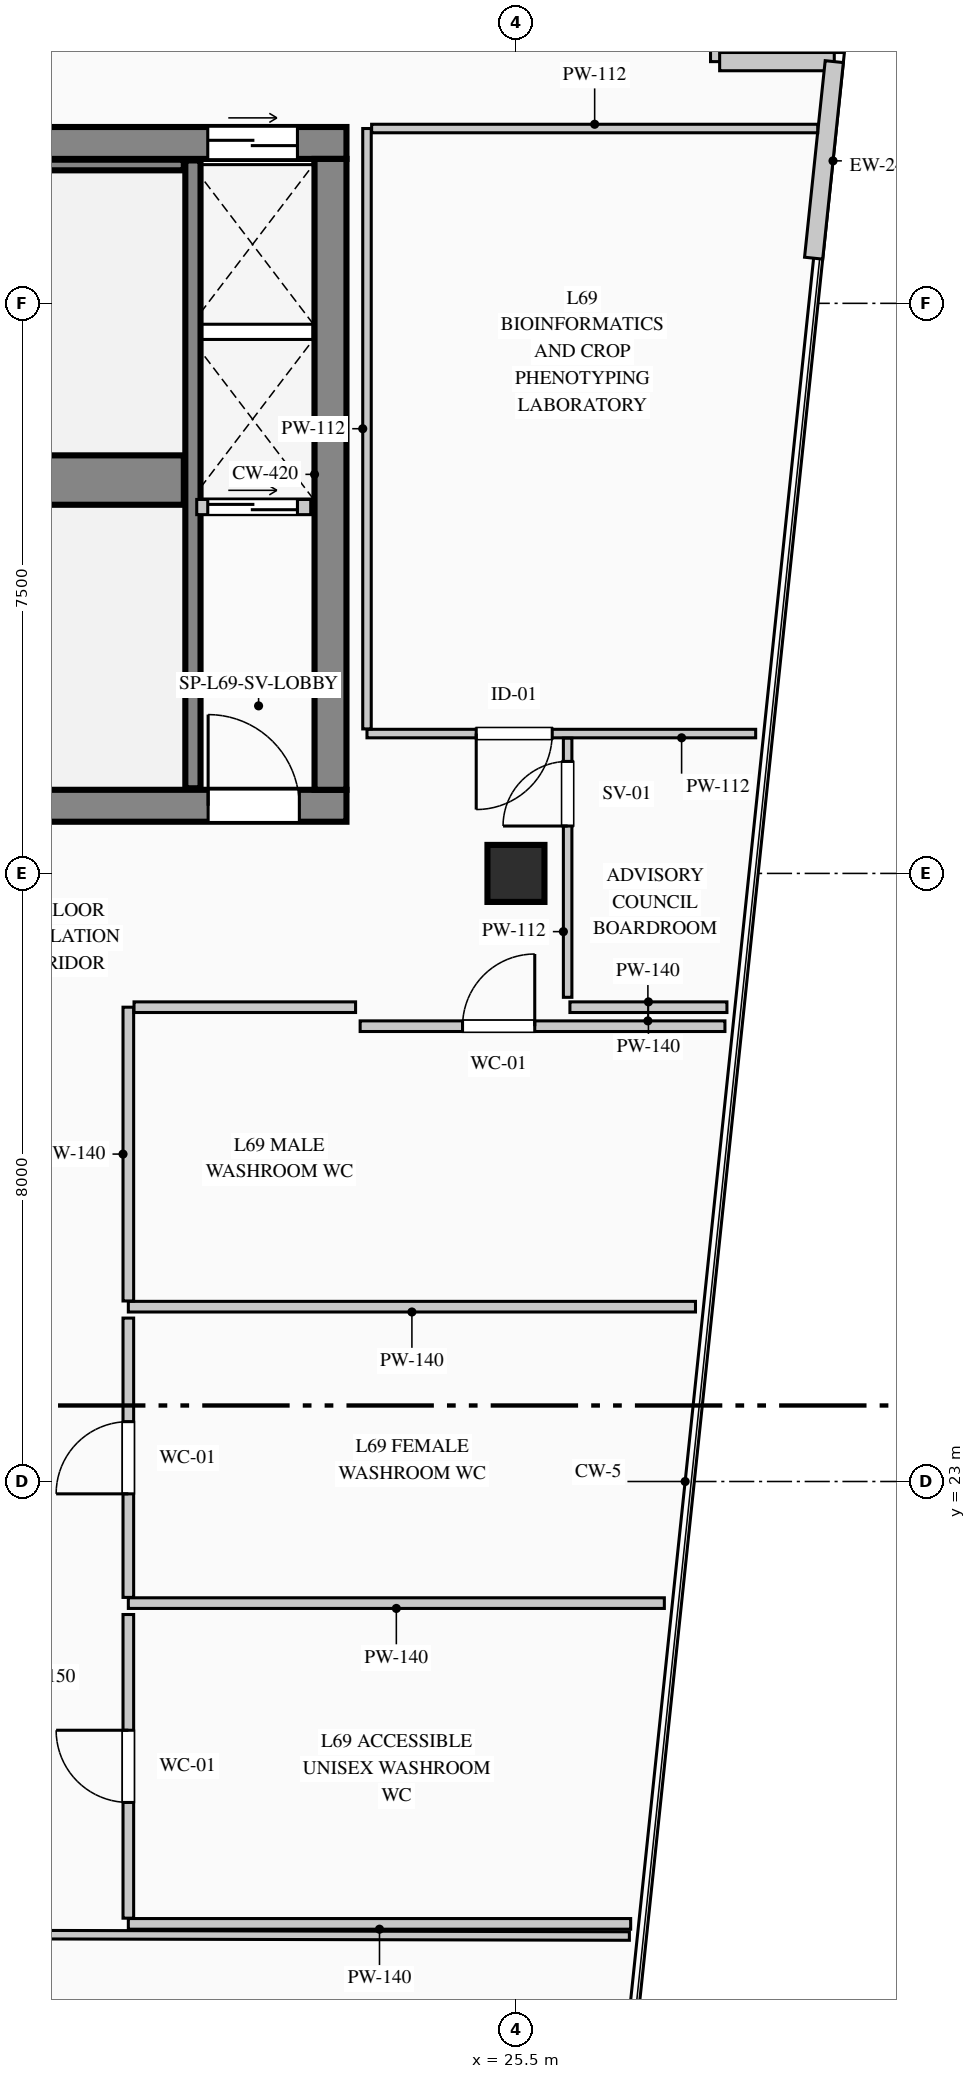
"""IFC4 building model, lengths in metres.
Left out: names, types, materials, properties, quantities, classifications, styles, units other than length and angle.
Written with IfcOpenShell. Run it as: python <this file> out.ifc"""

import sys

from ifc_helpers import new_model, si_unit, direction, frame, frame_2d, origin, origin_2d, place, context, subcontext, project, spatial, rectangle, extrude, element, fill, save


model = new_model("IFC4")
c1 = context("Model", 3, precision=1e-05, world=origin(), true_north=direction((0.0, 1.0)))
c2 = subcontext(c1, "Body", "Model", "MODEL_VIEW")
j1 = project(units=[si_unit("LENGTHUNIT", "METRE"), si_unit("PLANEANGLEUNIT", "RADIAN")], contexts=[c1])
p1 = place(None, origin())
s1 = spatial("IfcSite", under=j1, at=p1, CompositionType="ELEMENT")
p2 = place(p1, origin())
s2 = spatial("IfcBuilding", under=s1, at=p2, CompositionType="ELEMENT")
p3 = place(p2, frame((0.0, 0.0, 288.3)))
s3 = spatial("IfcBuildingStorey", under=s2, at=p3, CompositionType="ELEMENT", Elevation=288.3)
p4 = place(p3, frame((5.58, 40.61, 0.0), z_axis=(0.0, 0.0, 1.0), x_axis=(1.0, 0.0, 0.0)))
e1 = element("IfcWall", 1, at=p4, inside=s3, PredefinedType="SHEAR", context=c2, shape_type="SweptSolid", body=[
    extrude(rectangle(XDim=17.69, YDim=0.42, at=frame_2d((8.845, 0.0))), origin(), (0.0, 0.0, 1.0), 3.95),
])
p5 = place(p4, frame((15.865, 0.0, 0.0)))
e2 = element("IfcOpeningElement", 2, at=p5, cuts=e1, PredefinedType="OPENING", context=c2, shape_type="SweptSolid", body=[
    extrude(rectangle(XDim=1.18, YDim=2.25, at=frame_2d((0.59, 1.125))), frame((0.0, 0.22, 0.0), z_axis=(0.0, -1.0, 0.0), x_axis=(1.0, 0.0, 0.0)), (0.0, 0.0, 1.0), 0.44),
])
p6 = place(p3, frame((5.58, 31.89, 0.0), z_axis=(0.0, 0.0, 1.0), x_axis=(1.0, 0.0, 0.0)))
e3 = element("IfcWall", 3, at=p6, inside=s3, PredefinedType="SHEAR", context=c2, shape_type="SweptSolid", body=[
    extrude(rectangle(XDim=17.69, YDim=0.42, at=frame_2d((8.845, 0.0))), origin(), (0.0, 0.0, 1.0), 3.95),
])
p7 = place(p6, frame((3.07, 0.0, 0.0)))
e4 = element("IfcOpeningElement", 4, at=p7, cuts=e3, PredefinedType="OPENING", context=c2, shape_type="SweptSolid", body=[
    extrude(rectangle(XDim=1.2, YDim=2.2, at=frame_2d((0.6, 1.1))), frame((0.0, 0.22, 0.0), z_axis=(0.0, -1.0, 0.0), x_axis=(1.0, 0.0, 0.0)), (0.0, 0.0, 1.0), 0.44),
])
p8 = place(p6, frame((6.92, 0.0, 0.0)))
e5 = element("IfcOpeningElement", 5, at=p8, cuts=e3, PredefinedType="OPENING", context=c2, shape_type="SweptSolid", body=[
    extrude(rectangle(XDim=1.2, YDim=2.2, at=frame_2d((0.6, 1.1))), frame((0.0, 0.22, 0.0), z_axis=(0.0, -1.0, 0.0), x_axis=(1.0, 0.0, 0.0)), (0.0, 0.0, 1.0), 0.44),
])
p9 = place(p6, frame((8.77, 0.0, 0.0)))
e6 = element("IfcOpeningElement", 6, at=p9, cuts=e3, PredefinedType="OPENING", context=c2, shape_type="SweptSolid", body=[
    extrude(rectangle(XDim=1.15, YDim=2.2, at=frame_2d((0.575, 1.1))), frame((0.0, 0.22, 0.0), z_axis=(0.0, -1.0, 0.0), x_axis=(1.0, 0.0, 0.0)), (0.0, 0.0, 1.0), 0.44),
])
p10 = place(p6, frame((15.87, 0.0, 0.0)))
e7 = element("IfcOpeningElement", 7, at=p10, cuts=e3, PredefinedType="OPENING", context=c2, shape_type="SweptSolid", body=[
    extrude(rectangle(XDim=1.2, YDim=2.2, at=frame_2d((0.6, 1.1))), frame((0.0, 0.22, 0.0), z_axis=(0.0, -1.0, 0.0), x_axis=(1.0, 0.0, 0.0)), (0.0, 0.0, 1.0), 0.44),
])
p11 = place(p3, frame((23.06, 32.1, 0.0), z_axis=(0.0, 0.0, 1.0), x_axis=(0.0, 1.0, 0.0)))
e8 = element("IfcWall", 8, at=p11, inside=s3, PredefinedType="SHEAR", context=c2, shape_type="SweptSolid", body=[
    extrude(rectangle(XDim=8.3, YDim=0.42, at=frame_2d((4.15, 0.0))), origin(), (0.0, 0.0, 1.0), 3.95),
])
p12 = place(p3, frame((14.12, 36.175, 0.0), z_axis=(0.0, 0.0, 1.0), x_axis=(1.0, 0.0, 0.0)))
e9 = element("IfcWall", 9, at=p12, inside=s3, PredefinedType="SHEAR", context=c2, shape_type="SweptSolid", body=[
    extrude(rectangle(XDim=7.01, YDim=0.65, at=frame_2d((3.505, 0.0))), origin(), (0.0, 0.0, 1.0), 3.95),
])
p13 = place(p3, frame((21.25, 32.12, 0.0), z_axis=(0.0, 0.0, 1.0), x_axis=(0.0, 1.0, 0.0)))
e10 = element("IfcWall", 10, at=p13, inside=s3, PredefinedType="SHEAR", context=c2, shape_type="SweptSolid", body=[
    extrude(rectangle(XDim=8.26, YDim=0.2, at=frame_2d((4.13, 0.0))), origin(), (0.0, 0.0, 1.0), 3.95),
])
p14 = place(p3, frame((14.12, 40.32, 0.0), z_axis=(0.0, 0.0, 1.0), x_axis=(1.0, 0.0, 0.0)))
e11 = element("IfcWall", 11, at=p14, inside=s3, PredefinedType="SHEAR", context=c2, shape_type="SweptSolid", body=[
    extrude(rectangle(XDim=7.01, YDim=0.14, at=frame_2d((3.505, 0.0))), origin(), (0.0, 0.0, 1.0), 3.95),
])
p15 = place(p3, frame((25.5, 31.0, 0.0), z_axis=(0.0, 0.0, 1.0), x_axis=(1.0, 0.0, 0.0)))
e12 = element("IfcColumn", 12, at=p15, inside=s3, PredefinedType="COLUMN", context=c2, shape_type="SweptSolid", body=[
    extrude(rectangle(XDim=0.75, YDim=0.75, at=origin_2d()), origin(), (0.0, 0.0, 1.0), 3.95),
])
p16 = place(p3, frame((28.18, 43.38, 0.0), z_axis=(0.0, 0.0, 1.0), x_axis=(0.0, -1.0, 0.0)))
e13 = element("IfcWall", 13, at=p16, inside=s3, PredefinedType="STANDARD", context=c2, shape_type="SweptSolid", body=[
    extrude(rectangle(XDim=1.7, YDim=0.24, at=frame_2d((0.85, 0.0))), origin(), (0.0, 0.0, 1.0), 3.7),
])
p17 = place(p3, frame((28.18, 41.68, 0.0), z_axis=(0.0, 0.0, 1.0), x_axis=(1.0, 0.0, 0.0)))
e14 = element("IfcWall", 14, at=p17, inside=s3, PredefinedType="STANDARD", context=c2, shape_type="SweptSolid", body=[
    extrude(rectangle(XDim=1.508, YDim=0.24, at=frame_2d((0.754, 0.0))), origin(), (0.0, 0.0, 1.0), 3.7),
])
p18 = place(p3, frame((29.688, 41.68, 0.0), z_axis=(0.0, 0.0, 1.0), x_axis=(-0.104420821624, -0.994533203071, 0.0)))
e15 = element("IfcWall", 15, at=p18, inside=s3, PredefinedType="STANDARD", context=c2, shape_type="SweptSolid", body=[
    extrude(rectangle(XDim=2.6, YDim=0.24, at=frame_2d((1.3, 0.0))), origin(), (0.0, 0.0, 1.0), 3.7),
])
p19 = place(p3, frame((21.3, 35.82, 0.0), z_axis=(0.0, 0.0, 1.0), x_axis=(1.0, 0.0, 0.0)))
e16 = element("IfcWall", 16, at=p19, inside=s3, PredefinedType="PARTITIONING", context=c2, shape_type="SweptSolid", body=[
    extrude(rectangle(XDim=1.5, YDim=0.2, at=frame_2d((0.75, 0.0))), origin(), (0.0, 0.0, 1.0), 3.7),
])
p20 = place(p19, frame((0.145, 0.0, 0.0)))
e17 = element("IfcOpeningElement", 17, at=p20, cuts=e16, PredefinedType="OPENING", context=c2, shape_type="SweptSolid", body=[
    extrude(rectangle(XDim=1.18, YDim=2.25, at=frame_2d((0.59, 1.125))), frame((0.0, 0.11, 0.0), z_axis=(0.0, -1.0, 0.0), x_axis=(1.0, 0.0, 0.0)), (0.0, 0.0, 1.0), 0.22),
])
p21 = place(p3, frame((28.654, 32.84, 0.0), z_axis=(0.0, 0.0, 1.0), x_axis=(-1.0, 0.0, 0.0)))
e18 = element("IfcWall", 18, at=p21, inside=s3, PredefinedType="PARTITIONING", context=c2, shape_type="SweptSolid", body=[
    extrude(rectangle(XDim=5.114, YDim=0.112, at=frame_2d((2.557, 0.0))), origin(), (0.0, 0.0, 1.0), 3.7),
])
p22 = place(p21, frame((2.677, 0.0, 0.0)))
e19 = element("IfcOpeningElement", 19, at=p22, cuts=e18, PredefinedType="OPENING", context=c2, shape_type="SweptSolid", body=[
    extrude(rectangle(XDim=1.0, YDim=2.15, at=frame_2d((0.5, 1.075))), frame((0.0, 0.066, 0.0), z_axis=(0.0, -1.0, 0.0), x_axis=(1.0, 0.0, 0.0)), (0.0, 0.0, 1.0), 0.132),
])
p23 = place(p3, frame((23.54, 32.901, 0.0), z_axis=(0.0, 0.0, 1.0), x_axis=(0.0, 1.0, 0.0)))
e20 = element("IfcWall", 20, at=p23, inside=s3, PredefinedType="PARTITIONING", context=c2, shape_type="SweptSolid", body=[
    extrude(rectangle(XDim=7.899, YDim=0.112, at=frame_2d((3.95, 0.0))), origin(), (0.0, 0.0, 1.0), 3.7),
])
p24 = place(p3, frame((23.601, 40.8, 0.0), z_axis=(0.0, 0.0, 1.0), x_axis=(1.0, 0.0, 0.0)))
e21 = element("IfcWall", 21, at=p24, inside=s3, PredefinedType="PARTITIONING", context=c2, shape_type="SweptSolid", body=[
    extrude(rectangle(XDim=5.869, YDim=0.112, at=frame_2d((2.935, 0.0))), origin(), (0.0, 0.0, 1.0), 3.7),
])
p25 = place(p3, frame((23.45, 28.99, 0.0), z_axis=(0.0, 0.0, 1.0), x_axis=(1.0, 0.0, 0.0)))
e22 = element("IfcWall", 22, at=p25, inside=s3, PredefinedType="PARTITIONING", context=c2, shape_type="SweptSolid", body=[
    extrude(rectangle(XDim=4.8, YDim=0.14, at=frame_2d((2.4, 0.0))), origin(), (0.0, 0.0, 1.0), 3.7),
])
p26 = place(p25, frame((1.347, 0.0, 0.0)))
e23 = element("IfcOpeningElement", 23, at=p26, cuts=e22, PredefinedType="OPENING", context=c2, shape_type="SweptSolid", body=[
    extrude(rectangle(XDim=0.95, YDim=2.15, at=frame_2d((0.475, 1.075))), frame((0.0, 0.08, 0.0), z_axis=(0.0, -1.0, 0.0), x_axis=(1.0, 0.0, 0.0)), (0.0, 0.0, 1.0), 0.16),
])
p27 = place(p3, frame((26.21, 29.24, 0.0), z_axis=(0.0, 0.0, 1.0), x_axis=(1.0, 0.0, 0.0)))
e24 = element("IfcWall", 24, at=p27, inside=s3, PredefinedType="PARTITIONING", context=c2, shape_type="SweptSolid", body=[
    extrude(rectangle(XDim=2.066, YDim=0.14, at=frame_2d((1.033, 0.0))), origin(), (0.0, 0.0, 1.0), 3.7),
])
p28 = place(p3, frame((27.862, 25.3, 0.0), z_axis=(0.0, 0.0, 1.0), x_axis=(-1.0, 0.0, 0.0)))
e25 = element("IfcWall", 25, at=p28, inside=s3, PredefinedType="PARTITIONING", context=c2, shape_type="SweptSolid", body=[
    extrude(rectangle(XDim=7.462, YDim=0.14, at=frame_2d((3.731, 0.0))), origin(), (0.0, 0.0, 1.0), 3.7),
])
p29 = place(p3, frame((20.4, 25.375, 0.0), z_axis=(0.0, 0.0, 1.0), x_axis=(0.0, 1.0, 0.0)))
e26 = element("IfcWall", 26, at=p29, inside=s3, PredefinedType="PARTITIONING", context=c2, shape_type="SweptSolid", body=[
    extrude(rectangle(XDim=3.865, YDim=0.14, at=frame_2d((1.933, 0.0))), origin(), (0.0, 0.0, 1.0), 3.7),
])
p30 = place(p3, frame((20.475, 29.24, 0.0), z_axis=(0.0, 0.0, 1.0), x_axis=(1.0, 0.0, 0.0)))
e27 = element("IfcWall", 27, at=p30, inside=s3, PredefinedType="PARTITIONING", context=c2, shape_type="SweptSolid", body=[
    extrude(rectangle(XDim=2.915, YDim=0.14, at=frame_2d((1.458, 0.0))), origin(), (0.0, 0.0, 1.0), 3.7),
])
p31 = place(p3, frame((27.452, 21.4, 0.0), z_axis=(0.0, 0.0, 1.0), x_axis=(-1.0, 0.0, 0.0)))
e28 = element("IfcWall", 28, at=p31, inside=s3, PredefinedType="PARTITIONING", context=c2, shape_type="SweptSolid", body=[
    extrude(rectangle(XDim=7.052, YDim=0.14, at=frame_2d((3.526, 0.0))), origin(), (0.0, 0.0, 1.0), 3.7),
])
p32 = place(p3, frame((20.4, 21.475, 0.0), z_axis=(0.0, 0.0, 1.0), x_axis=(0.0, 1.0, 0.0)))
e29 = element("IfcWall", 29, at=p32, inside=s3, PredefinedType="PARTITIONING", context=c2, shape_type="SweptSolid", body=[
    extrude(rectangle(XDim=3.675, YDim=0.14, at=frame_2d((1.837, 0.0))), origin(), (0.0, 0.0, 1.0), 3.7),
])
p33 = place(p32, frame((1.363, 0.0, 0.0)))
e30 = element("IfcOpeningElement", 30, at=p33, cuts=e29, PredefinedType="OPENING", context=c2, shape_type="SweptSolid", body=[
    extrude(rectangle(XDim=0.95, YDim=2.15, at=frame_2d((0.475, 1.075))), frame((0.0, 0.08, 0.0), z_axis=(0.0, -1.0, 0.0), x_axis=(1.0, 0.0, 0.0)), (0.0, 0.0, 1.0), 0.16),
])
p34 = place(p3, frame((27.009, 17.18, 0.0), z_axis=(0.0, 0.0, 1.0), x_axis=(-1.0, 0.0, 0.0)))
e31 = element("IfcWall", 31, at=p34, inside=s3, PredefinedType="PARTITIONING", context=c2, shape_type="SweptSolid", body=[
    extrude(rectangle(XDim=6.609, YDim=0.14, at=frame_2d((3.305, 0.0))), origin(), (0.0, 0.0, 1.0), 3.7),
])
p35 = place(p3, frame((20.4, 17.255, 0.0), z_axis=(0.0, 0.0, 1.0), x_axis=(0.0, 1.0, 0.0)))
e32 = element("IfcWall", 32, at=p35, inside=s3, PredefinedType="PARTITIONING", context=c2, shape_type="SweptSolid", body=[
    extrude(rectangle(XDim=3.995, YDim=0.14, at=frame_2d((1.998, 0.0))), origin(), (0.0, 0.0, 1.0), 3.7),
])
p36 = place(p35, frame((1.522, 0.0, 0.0)))
e33 = element("IfcOpeningElement", 33, at=p36, cuts=e32, PredefinedType="OPENING", context=c2, shape_type="SweptSolid", body=[
    extrude(rectangle(XDim=0.95, YDim=2.15, at=frame_2d((0.475, 1.075))), frame((0.0, 0.08, 0.0), z_axis=(0.0, -1.0, 0.0), x_axis=(1.0, 0.0, 0.0)), (0.0, 0.0, 1.0), 0.16),
])
p37 = place(p3, frame((4.756, 17.071, 0.0), z_axis=(0.0, 0.0, 1.0), x_axis=(0.999997417422, -0.00227269645, 0.0)))
e34 = element("IfcWall", 34, at=p37, inside=s3, PredefinedType="PARTITIONING", context=c2, shape_type="SweptSolid", body=[
    extrude(rectangle(XDim=22.237, YDim=0.112, at=frame_2d((11.118, 0.0))), origin(), (0.0, 0.0, 1.0), 3.7),
])
p38 = place(p37, frame((10.618, 0.0, 0.0)))
e35 = element("IfcOpeningElement", 35, at=p38, cuts=e34, PredefinedType="OPENING", context=c2, shape_type="SweptSolid", body=[
    extrude(rectangle(XDim=1.0, YDim=2.15, at=frame_2d((0.5, 1.075))), frame((0.0, 0.066, 0.0), z_axis=(0.0, -1.0, 0.0), x_axis=(1.0, 0.0, 0.0)), (0.0, 0.0, 1.0), 0.132),
])
p39 = place(p3, frame((26.18, 29.37, 0.0), z_axis=(0.0, 0.0, 1.0), x_axis=(0.0, 1.0, 0.0)))
e36 = element("IfcWall", 36, at=p39, inside=s3, PredefinedType="PARTITIONING", context=c2, shape_type="SweptSolid", body=[
    extrude(rectangle(XDim=3.409, YDim=0.112, at=frame_2d((1.705, 0.0))), origin(), (0.0, 0.0, 1.0), 3.7),
])
p40 = place(p39, frame((2.253, 0.0, 0.0)))
e37 = element("IfcOpeningElement", 37, at=p40, cuts=e36, PredefinedType="OPENING", context=c2, shape_type="SweptSolid", body=[
    extrude(rectangle(XDim=0.85, YDim=2.1, at=frame_2d((0.425, 1.05))), frame((0.0, 0.066, 0.0), z_axis=(0.0, -1.0, 0.0), x_axis=(1.0, 0.0, 0.0)), (0.0, 0.0, 1.0), 0.132),
])
p41 = place(p10, origin())
e38 = element("IfcDoor", 38, at=p41, inside=s3, OperationType="SINGLE_SWING_LEFT", PredefinedType="DOOR", context=c2, shape_type="SweptSolid", body=[
    extrude(rectangle(XDim=1.2, YDim=2.2, at=frame_2d((0.6, 1.1))), frame((0.0, 0.025, 0.0), z_axis=(0.0, -1.0, 0.0), x_axis=(1.0, 0.0, 0.0)), (0.0, 0.0, 1.0), 0.05),
])
fill(e7, e38)
p42 = place(p5, origin())
e39 = element("IfcDoor", 39, at=p42, inside=s3, OperationType="DOUBLE_DOOR_SLIDING", PredefinedType="DOOR", context=c2, shape_type="SweptSolid", body=[
    extrude(rectangle(XDim=1.18, YDim=2.25, at=frame_2d((0.59, 1.125))), frame((0.0, 0.025, 0.0), z_axis=(0.0, -1.0, 0.0), x_axis=(1.0, 0.0, 0.0)), (0.0, 0.0, 1.0), 0.05),
])
fill(e2, e39)
p43 = place(p20, origin())
e40 = element("IfcDoor", 40, at=p43, inside=s3, OperationType="DOUBLE_DOOR_SLIDING", PredefinedType="DOOR", context=c2, shape_type="SweptSolid", body=[
    extrude(rectangle(XDim=1.18, YDim=2.25, at=frame_2d((0.59, 1.125))), frame((0.0, 0.025, 0.0), z_axis=(0.0, -1.0, 0.0), x_axis=(1.0, 0.0, 0.0)), (0.0, 0.0, 1.0), 0.05),
])
fill(e17, e40)
p44 = place(p22, origin())
e41 = element("IfcDoor", 41, at=p44, inside=s3, OperationType="SINGLE_SWING_RIGHT", PredefinedType="DOOR", context=c2, shape_type="SweptSolid", body=[
    extrude(rectangle(XDim=1.0, YDim=2.15, at=frame_2d((0.5, 1.075))), frame((0.0, 0.025, 0.0), z_axis=(0.0, -1.0, 0.0), x_axis=(1.0, 0.0, 0.0)), (0.0, 0.0, 1.0), 0.05),
])
fill(e19, e41)
p45 = place(p26, origin())
e42 = element("IfcDoor", 42, at=p45, inside=s3, OperationType="SINGLE_SWING_RIGHT", PredefinedType="DOOR", context=c2, shape_type="SweptSolid", body=[
    extrude(rectangle(XDim=0.95, YDim=2.15, at=frame_2d((0.475, 1.075))), frame((0.0, 0.025, 0.0), z_axis=(0.0, -1.0, 0.0), x_axis=(1.0, 0.0, 0.0)), (0.0, 0.0, 1.0), 0.05),
])
fill(e23, e42)
p46 = place(p33, origin())
e43 = element("IfcDoor", 43, at=p46, inside=s3, OperationType="SINGLE_SWING_LEFT", PredefinedType="DOOR", context=c2, shape_type="SweptSolid", body=[
    extrude(rectangle(XDim=0.95, YDim=2.15, at=frame_2d((0.475, 1.075))), frame((0.0, 0.025, 0.0), z_axis=(0.0, -1.0, 0.0), x_axis=(1.0, 0.0, 0.0)), (0.0, 0.0, 1.0), 0.05),
])
fill(e30, e43)
p47 = place(p36, origin())
e44 = element("IfcDoor", 44, at=p47, inside=s3, OperationType="SINGLE_SWING_RIGHT", PredefinedType="DOOR", context=c2, shape_type="SweptSolid", body=[
    extrude(rectangle(XDim=0.95, YDim=2.15, at=frame_2d((0.475, 1.075))), frame((0.0, 0.025, 0.0), z_axis=(0.0, -1.0, 0.0), x_axis=(1.0, 0.0, 0.0)), (0.0, 0.0, 1.0), 0.05),
])
fill(e33, e44)
p48 = place(p40, origin())
e45 = element("IfcDoor", 45, at=p48, inside=s3, OperationType="SINGLE_SWING_LEFT", PredefinedType="DOOR", context=c2, shape_type="SweptSolid", body=[
    extrude(rectangle(XDim=0.85, YDim=2.1, at=frame_2d((0.425, 1.05))), frame((0.0, 0.025, 0.0), z_axis=(0.0, -1.0, 0.0), x_axis=(1.0, 0.0, 0.0)), (0.0, 0.0, 1.0), 0.05),
])
fill(e37, e45)
save(model, sys.argv[1])
